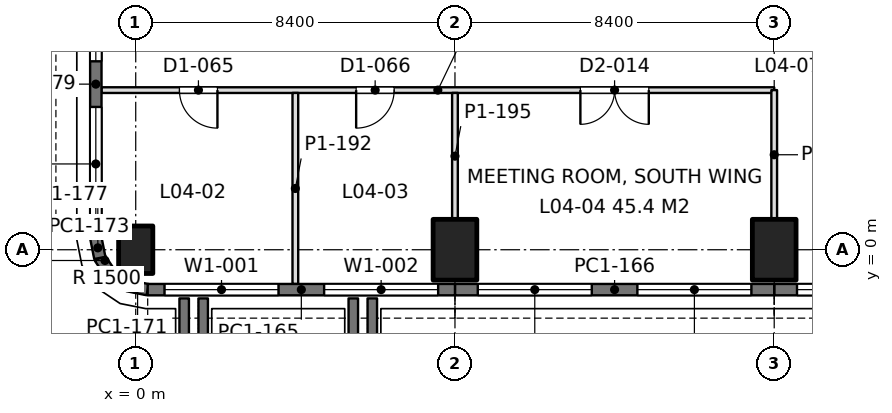
"""IFC4 building model, lengths in metres.
Left out: names, types, materials, properties, quantities, classifications, styles, units other than length and angle.
Written with IfcOpenShell. Run it as: python <this file> out.ifc"""

import sys

from ifc_helpers import new_model, si_unit, direction, frame, frame_2d, origin, origin_with_axes, origin_2d, place, context, subcontext, project, spatial, rectangle, extrude, element, fill, save


model = new_model("IFC4")
c1 = context("Model", 3, precision=1e-05, world=origin(), true_north=direction((0.0, 1.0)))
c2 = subcontext(c1, "Body", "Model", "MODEL_VIEW")
j1 = project(units=[si_unit("LENGTHUNIT", "METRE"), si_unit("PLANEANGLEUNIT", "RADIAN")], contexts=[c1])
p1 = place(None, origin())
s1 = spatial("IfcSite", under=j1, at=p1, CompositionType="ELEMENT")
p2 = place(p1, origin())
s2 = spatial("IfcBuilding", under=s1, at=p2, CompositionType="ELEMENT")
p3 = place(p2, frame((0.0, 0.0, 18.9)))
s3 = spatial("IfcBuildingStorey", under=s2, at=p3, CompositionType="ELEMENT", Elevation=18.9)
p4 = place(p3, origin_with_axes())
e1 = element("IfcColumn", 1, at=p4, inside=s3, PredefinedType="COLUMN", context=c2, shape_type="SweptSolid", body=[
    extrude(rectangle(XDim=0.9, YDim=1.25, at=origin_2d()), origin(), (0.0, 0.0, 1.0), 4.5),
])
for number, where, z_axis, x_axis in (
    (2, (8.4, 0.0, 0.0), (0.0, 0.0, 1.0), (1.0, 0.0, 0.0)),
    (3, (16.8, 0.0, 0.0), (0.0, 0.0, 1.0), (1.0, 0.0, 0.0)),
):
    element("IfcColumn", number, at=place(p3, frame(where, z_axis=z_axis, x_axis=x_axis)), inside=s3, PredefinedType="COLUMN", context=c2, shape_type="SweptSolid", body=[
        extrude(rectangle(XDim=1.15, YDim=1.6, at=origin_2d()), origin(), (0.0, 0.0, 1.0), 4.5),
    ])
p5 = place(p3, frame((25.2, -1.05, 0.0), z_axis=(0.0, 0.0, 1.0), x_axis=(-1.0, 0.0, 0.0)))
e4 = element("IfcWall", 4, at=p5, inside=s3, PredefinedType="SOLIDWALL", context=c2, shape_type="SweptSolid", body=[
    extrude(rectangle(XDim=8.4, YDim=0.3, at=frame_2d((4.2, 0.0))), origin(), (0.0, 0.0, 1.0), 4.34),
])
p6 = place(p5, frame((0.6, 0.0, 0.9)))
e5 = element("IfcOpeningElement", 5, at=p6, cuts=e4, PredefinedType="OPENING", context=c2, shape_type="SweptSolid", body=[
    extrude(rectangle(XDim=3.0, YDim=1.9, at=frame_2d((1.5, 0.95))), frame((0.0, 0.16, 0.0), z_axis=(0.0, -1.0, 0.0), x_axis=(1.0, 0.0, 0.0)), (0.0, 0.0, 1.0), 0.32),
])
p7 = place(p5, frame((4.8, 0.0, 0.9)))
e6 = element("IfcOpeningElement", 6, at=p7, cuts=e4, PredefinedType="OPENING", context=c2, shape_type="SweptSolid", body=[
    extrude(rectangle(XDim=3.0, YDim=1.9, at=frame_2d((1.5, 0.95))), frame((0.0, 0.16, 0.0), z_axis=(0.0, -1.0, 0.0), x_axis=(1.0, 0.0, 0.0)), (0.0, 0.0, 1.0), 0.32),
])
p8 = place(p3, frame((16.8, -1.05, 0.0), z_axis=(0.0, 0.0, 1.0), x_axis=(-1.0, 0.0, 0.0)))
e7 = element("IfcWall", 7, at=p8, inside=s3, PredefinedType="SOLIDWALL", context=c2, shape_type="SweptSolid", body=[
    extrude(rectangle(XDim=8.4, YDim=0.3, at=frame_2d((4.2, 0.0))), origin(), (0.0, 0.0, 1.0), 4.34),
])
p9 = place(p8, frame((0.6, 0.0, 0.9)))
e8 = element("IfcOpeningElement", 8, at=p9, cuts=e7, PredefinedType="OPENING", context=c2, shape_type="SweptSolid", body=[
    extrude(rectangle(XDim=3.0, YDim=1.9, at=frame_2d((1.5, 0.95))), frame((0.0, 0.16, 0.0), z_axis=(0.0, -1.0, 0.0), x_axis=(1.0, 0.0, 0.0)), (0.0, 0.0, 1.0), 0.32),
])
p10 = place(p8, frame((4.8, 0.0, 0.9)))
e9 = element("IfcOpeningElement", 9, at=p10, cuts=e7, PredefinedType="OPENING", context=c2, shape_type="SweptSolid", body=[
    extrude(rectangle(XDim=3.0, YDim=1.9, at=frame_2d((1.5, 0.95))), frame((0.0, 0.16, 0.0), z_axis=(0.0, -1.0, 0.0), x_axis=(1.0, 0.0, 0.0)), (0.0, 0.0, 1.0), 0.32),
])
p11 = place(p3, frame((8.4, -1.05, 0.0), z_axis=(0.0, 0.0, 1.0), x_axis=(-1.0, 0.0, 0.0)))
e10 = element("IfcWall", 10, at=p11, inside=s3, PredefinedType="SOLIDWALL", context=c2, shape_type="SweptSolid", body=[
    extrude(rectangle(XDim=8.085, YDim=0.3, at=frame_2d((4.042, 0.0))), origin(), (0.0, 0.0, 1.0), 4.34),
])
p12 = place(p11, frame((0.443, 0.0, 0.9)))
e11 = element("IfcOpeningElement", 11, at=p12, cuts=e10, PredefinedType="OPENING", context=c2, shape_type="SweptSolid", body=[
    extrude(rectangle(XDim=3.0, YDim=1.9, at=frame_2d((1.5, 0.95))), frame((0.0, 0.16, 0.0), z_axis=(0.0, -1.0, 0.0), x_axis=(1.0, 0.0, 0.0)), (0.0, 0.0, 1.0), 0.32),
])
p13 = place(p11, frame((4.643, 0.0, 0.9)))
e12 = element("IfcOpeningElement", 12, at=p13, cuts=e10, PredefinedType="OPENING", context=c2, shape_type="SweptSolid", body=[
    extrude(rectangle(XDim=3.0, YDim=1.9, at=frame_2d((1.5, 0.95))), frame((0.0, 0.16, 0.0), z_axis=(0.0, -1.0, 0.0), x_axis=(1.0, 0.0, 0.0)), (0.0, 0.0, 1.0), 0.32),
])
p14 = place(p3, frame((0.315, -1.05, 0.0), z_axis=(0.0, 0.0, 1.0), x_axis=(-0.980788534345, 0.195073962632, 0.0)))
e13 = element("IfcWall", 13, at=p14, inside=s3, PredefinedType="SOLIDWALL", context=c2, shape_type="SweptSolid", body=[
    extrude(rectangle(XDim=0.541, YDim=0.3, at=frame_2d((0.271, 0.0))), origin(), (0.0, 0.0, 1.0), 4.34),
])
for number, where, z_axis, x_axis in (
    (14, (-0.216, -0.945, 0.0), (0.0, 0.0, 1.0), (-0.831, 0.556, 0.0)),
    (15, (-0.653, -0.653, 0.0), (0.0, 0.0, 1.0), (-0.556, 0.831, 0.0)),
):
    element("IfcWall", number, at=place(p3, frame(where, z_axis=z_axis, x_axis=x_axis)), inside=s3, PredefinedType="SOLIDWALL", context=c2, shape_type="SweptSolid", body=[
        extrude(rectangle(XDim=0.526, YDim=0.3, at=frame_2d((0.263, 0.0))), origin(), (0.0, 0.0, 1.0), 4.34),
    ])
p15 = place(p3, frame((-0.945, -0.216, 0.0), z_axis=(0.0, 0.0, 1.0), x_axis=(-0.195073962632, 0.980788534345, 0.0)))
e16 = element("IfcWall", 16, at=p15, inside=s3, PredefinedType="SOLIDWALL", context=c2, shape_type="SweptSolid", body=[
    extrude(rectangle(XDim=0.541, YDim=0.3, at=frame_2d((0.271, 0.0))), origin(), (0.0, 0.0, 1.0), 4.34),
])
p16 = place(p3, frame((-1.05, 0.315, 0.0), z_axis=(0.0, 0.0, 1.0), x_axis=(0.0, 1.0, 0.0)))
e17 = element("IfcWall", 17, at=p16, inside=s3, PredefinedType="SOLIDWALL", context=c2, shape_type="SweptSolid", body=[
    extrude(rectangle(XDim=8.085, YDim=0.3, at=frame_2d((4.042, 0.0))), origin(), (0.0, 0.0, 1.0), 4.34),
])
p17 = place(p16, frame((0.443, 0.0, 0.9)))
e18 = element("IfcOpeningElement", 18, at=p17, cuts=e17, PredefinedType="OPENING", context=c2, shape_type="SweptSolid", body=[
    extrude(rectangle(XDim=3.0, YDim=1.9, at=frame_2d((1.5, 0.95))), frame((0.0, 0.16, 0.0), z_axis=(0.0, -1.0, 0.0), x_axis=(1.0, 0.0, 0.0)), (0.0, 0.0, 1.0), 0.32),
])
p18 = place(p16, frame((4.643, 0.0, 0.9)))
e19 = element("IfcOpeningElement", 19, at=p18, cuts=e17, PredefinedType="OPENING", context=c2, shape_type="SweptSolid", body=[
    extrude(rectangle(XDim=3.0, YDim=1.9, at=frame_2d((1.5, 0.95))), frame((0.0, 0.16, 0.0), z_axis=(0.0, -1.0, 0.0), x_axis=(1.0, 0.0, 0.0)), (0.0, 0.0, 1.0), 0.32),
])
for number, where, z_axis, x_axis in (
    (20, (1.275, -1.28, 0.0), (0.0, 0.0, 1.0), (0.0, -1.0, 0.0)),
    (21, (1.775, -9.28, 0.0), (0.0, 0.0, 1.0), (0.0, 1.0, 0.0)),
    (22, (5.725, -1.28, 0.0), (0.0, 0.0, 1.0), (0.0, -1.0, 0.0)),
    (23, (6.225, -9.28, 0.0), (0.0, 0.0, 1.0), (0.0, 1.0, 0.0)),
):
    element("IfcWall", number, at=place(p3, frame(where, z_axis=z_axis, x_axis=x_axis)), inside=s3, PredefinedType="PARAPET", context=c2, shape_type="SweptSolid", body=[
        extrude(rectangle(XDim=8.0, YDim=0.25, at=frame_2d((4.0, 0.0))), origin(), (0.0, 0.0, 1.0), 1.1),
    ])
p19 = place(p3, frame((-0.902, 4.2, 0.0), z_axis=(0.0, 0.0, 1.0), x_axis=(1.0, 0.0, 0.0)))
e24 = element("IfcWall", 24, at=p19, inside=s3, PredefinedType="PARTITIONING", context=c2, shape_type="SweptSolid", body=[
    extrude(rectangle(XDim=17.702, YDim=0.15, at=frame_2d((8.851, 0.0))), origin(), (0.0, 0.0, 1.0), 3.74),
])
p20 = place(p19, frame((2.052, 0.0, 0.0)))
e25 = element("IfcOpeningElement", 25, at=p20, cuts=e24, PredefinedType="OPENING", context=c2, shape_type="SweptSolid", body=[
    extrude(rectangle(XDim=1.0, YDim=2.2, at=frame_2d((0.5, 1.1))), frame((0.0, 0.085, 0.0), z_axis=(0.0, -1.0, 0.0), x_axis=(1.0, 0.0, 0.0)), (0.0, 0.0, 1.0), 0.17),
])
p21 = place(p19, frame((6.702, 0.0, 0.0)))
e26 = element("IfcOpeningElement", 26, at=p21, cuts=e24, PredefinedType="OPENING", context=c2, shape_type="SweptSolid", body=[
    extrude(rectangle(XDim=1.0, YDim=2.2, at=frame_2d((0.5, 1.1))), frame((0.0, 0.085, 0.0), z_axis=(0.0, -1.0, 0.0), x_axis=(1.0, 0.0, 0.0)), (0.0, 0.0, 1.0), 0.17),
])
p22 = place(p19, frame((12.602, 0.0, 0.0)))
e27 = element("IfcOpeningElement", 27, at=p22, cuts=e24, PredefinedType="OPENING", context=c2, shape_type="SweptSolid", body=[
    extrude(rectangle(XDim=1.8, YDim=2.2, at=frame_2d((0.9, 1.1))), frame((0.0, 0.085, 0.0), z_axis=(0.0, -1.0, 0.0), x_axis=(1.0, 0.0, 0.0)), (0.0, 0.0, 1.0), 0.17),
])
p23 = place(p3, frame((4.2, -0.902, 0.0), z_axis=(0.0, 0.0, 1.0), x_axis=(0.0, 1.0, 0.0)))
e28 = element("IfcWall", 28, at=p23, inside=s3, PredefinedType="PARTITIONING", context=c2, shape_type="SweptSolid", body=[
    extrude(rectangle(XDim=5.028, YDim=0.15, at=frame_2d((2.514, 0.0))), origin(), (0.0, 0.0, 1.0), 3.84),
])
p24 = place(p3, frame((8.4, 0.799, 0.0), z_axis=(0.0, 0.0, 1.0), x_axis=(0.0, 1.0, 0.0)))
e29 = element("IfcWall", 29, at=p24, inside=s3, PredefinedType="PARTITIONING", context=c2, shape_type="SweptSolid", body=[
    extrude(rectangle(XDim=3.327, YDim=0.15, at=frame_2d((1.664, 0.0))), origin(), (0.0, 0.0, 1.0), 3.74),
])
p25 = place(p3, frame((16.8, 0.799, 0.0), z_axis=(0.0, 0.0, 1.0), x_axis=(0.0, 1.0, 0.0)))
e30 = element("IfcWall", 30, at=p25, inside=s3, PredefinedType="PARTITIONING", context=c2, shape_type="SweptSolid", body=[
    extrude(rectangle(XDim=3.401, YDim=0.15, at=frame_2d((1.7, 0.0))), origin(), (0.0, 0.0, 1.0), 3.74),
])
p26 = place(p7, origin())
e31 = element("IfcWindow", 31, at=p26, inside=s3, PartitioningType="SINGLE_PANEL", PredefinedType="WINDOW", context=c2, shape_type="SweptSolid", body=[
    extrude(rectangle(XDim=3.0, YDim=1.9, at=frame_2d((1.5, 0.95))), frame((0.0, 0.03, 0.0), z_axis=(0.0, -1.0, 0.0), x_axis=(1.0, 0.0, 0.0)), (0.0, 0.0, 1.0), 0.06),
])
fill(e6, e31)
p27 = place(p9, origin())
e32 = element("IfcWindow", 32, at=p27, inside=s3, PartitioningType="SINGLE_PANEL", PredefinedType="WINDOW", context=c2, shape_type="SweptSolid", body=[
    extrude(rectangle(XDim=3.0, YDim=1.9, at=frame_2d((1.5, 0.95))), frame((0.0, 0.03, 0.0), z_axis=(0.0, -1.0, 0.0), x_axis=(1.0, 0.0, 0.0)), (0.0, 0.0, 1.0), 0.06),
])
fill(e8, e32)
p28 = place(p10, origin())
e33 = element("IfcWindow", 33, at=p28, inside=s3, PartitioningType="SINGLE_PANEL", PredefinedType="WINDOW", context=c2, shape_type="SweptSolid", body=[
    extrude(rectangle(XDim=3.0, YDim=1.9, at=frame_2d((1.5, 0.95))), frame((0.0, 0.03, 0.0), z_axis=(0.0, -1.0, 0.0), x_axis=(1.0, 0.0, 0.0)), (0.0, 0.0, 1.0), 0.06),
])
fill(e9, e33)
p29 = place(p12, origin())
e34 = element("IfcWindow", 34, at=p29, inside=s3, PartitioningType="SINGLE_PANEL", PredefinedType="WINDOW", context=c2, shape_type="SweptSolid", body=[
    extrude(rectangle(XDim=3.0, YDim=1.9, at=frame_2d((1.5, 0.95))), frame((0.0, 0.03, 0.0), z_axis=(0.0, -1.0, 0.0), x_axis=(1.0, 0.0, 0.0)), (0.0, 0.0, 1.0), 0.06),
])
fill(e11, e34)
p30 = place(p13, origin())
e35 = element("IfcWindow", 35, at=p30, inside=s3, PartitioningType="SINGLE_PANEL", PredefinedType="WINDOW", context=c2, shape_type="SweptSolid", body=[
    extrude(rectangle(XDim=3.0, YDim=1.9, at=frame_2d((1.5, 0.95))), frame((0.0, 0.03, 0.0), z_axis=(0.0, -1.0, 0.0), x_axis=(1.0, 0.0, 0.0)), (0.0, 0.0, 1.0), 0.06),
])
fill(e12, e35)
p31 = place(p17, origin())
e36 = element("IfcWindow", 36, at=p31, inside=s3, PartitioningType="SINGLE_PANEL", PredefinedType="WINDOW", context=c2, shape_type="SweptSolid", body=[
    extrude(rectangle(XDim=3.0, YDim=1.9, at=frame_2d((1.5, 0.95))), frame((0.0, 0.03, 0.0), z_axis=(0.0, -1.0, 0.0), x_axis=(1.0, 0.0, 0.0)), (0.0, 0.0, 1.0), 0.06),
])
fill(e18, e36)
p32 = place(p18, origin())
e37 = element("IfcWindow", 37, at=p32, inside=s3, PartitioningType="SINGLE_PANEL", PredefinedType="WINDOW", context=c2, shape_type="SweptSolid", body=[
    extrude(rectangle(XDim=3.0, YDim=1.9, at=frame_2d((1.5, 0.95))), frame((0.0, 0.03, 0.0), z_axis=(0.0, -1.0, 0.0), x_axis=(1.0, 0.0, 0.0)), (0.0, 0.0, 1.0), 0.06),
])
fill(e19, e37)
p33 = place(p20, frame((1.0, 0.0, 0.0), z_axis=(0.0, 0.0, 1.0), x_axis=(-1.0, 0.0, 0.0)))
e38 = element("IfcDoor", 38, at=p33, inside=s3, OperationType="SINGLE_SWING_LEFT", PredefinedType="DOOR", context=c2, shape_type="SweptSolid", body=[
    extrude(rectangle(XDim=1.0, YDim=2.2, at=frame_2d((0.5, 1.1))), frame((0.0, 0.025, 0.0), z_axis=(0.0, -1.0, 0.0), x_axis=(1.0, 0.0, 0.0)), (0.0, 0.0, 1.0), 0.05),
])
fill(e25, e38)
p34 = place(p21, frame((1.0, 0.0, 0.0), z_axis=(0.0, 0.0, 1.0), x_axis=(-1.0, 0.0, 0.0)))
e39 = element("IfcDoor", 39, at=p34, inside=s3, OperationType="SINGLE_SWING_RIGHT", PredefinedType="DOOR", context=c2, shape_type="SweptSolid", body=[
    extrude(rectangle(XDim=1.0, YDim=2.2, at=frame_2d((0.5, 1.1))), frame((0.0, 0.025, 0.0), z_axis=(0.0, -1.0, 0.0), x_axis=(1.0, 0.0, 0.0)), (0.0, 0.0, 1.0), 0.05),
])
fill(e26, e39)
p35 = place(p22, frame((1.8, 0.0, 0.0), z_axis=(0.0, 0.0, 1.0), x_axis=(-1.0, 0.0, 0.0)))
e40 = element("IfcDoor", 40, at=p35, inside=s3, OperationType="DOUBLE_DOOR_SINGLE_SWING", PredefinedType="DOOR", context=c2, shape_type="SweptSolid", body=[
    extrude(rectangle(XDim=1.8, YDim=2.2, at=frame_2d((0.9, 1.1))), frame((0.0, 0.025, 0.0), z_axis=(0.0, -1.0, 0.0), x_axis=(1.0, 0.0, 0.0)), (0.0, 0.0, 1.0), 0.05),
])
fill(e27, e40)
save(model, sys.argv[1])
